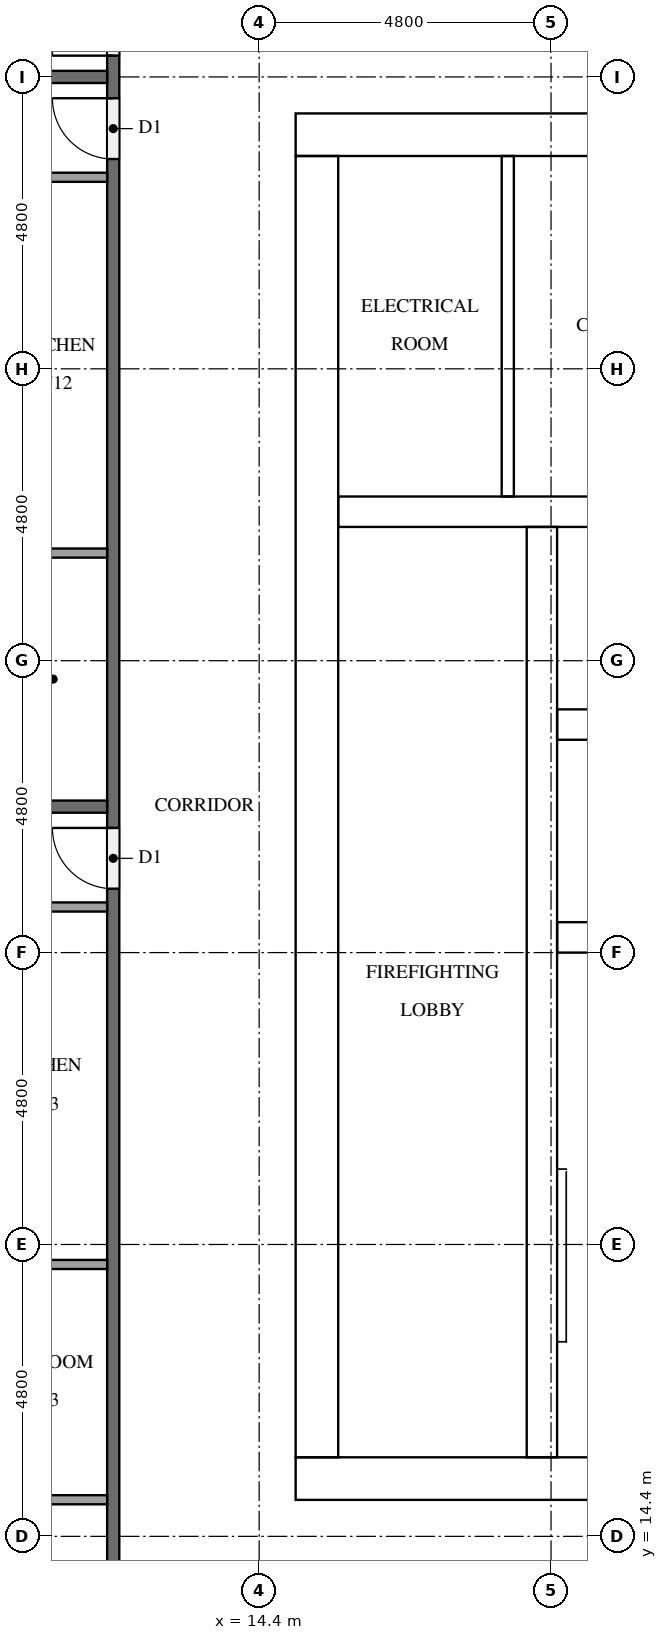
"""IFC4 building model, lengths in metres.
Left out: names, types, materials, properties, quantities, classifications, styles, units other than length and angle.
Written with IfcOpenShell. Run it as: python <this file> out.ifc"""

import sys

from ifc_helpers import new_model, si_unit, direction, frame, frame_2d, origin, place, context, subcontext, project, spatial, rectangle, extrude, element, fill, save


model = new_model("IFC4")
c1 = context("Model", 3, precision=1e-05, world=origin(), true_north=direction((0.0, 1.0)))
c2 = subcontext(c1, "Body", "Model", "MODEL_VIEW")
j1 = project(units=[si_unit("LENGTHUNIT", "METRE"), si_unit("PLANEANGLEUNIT", "RADIAN")], contexts=[c1])
p1 = place(None, origin())
s1 = spatial("IfcSite", under=j1, at=p1, CompositionType="ELEMENT")
p2 = place(p1, origin())
s2 = spatial("IfcBuilding", under=s1, at=p2, CompositionType="ELEMENT")
p3 = place(p2, frame((0.0, 0.0, 182.4)))
s3 = spatial("IfcBuildingStorey", under=s2, at=p3, CompositionType="ELEMENT", Elevation=182.4)
p4 = place(p3, frame((15.0, 15.35, 0.0), z_axis=(0.0, 0.0, 1.0), x_axis=(1.0, 0.0, 0.0)))
e1 = element("IfcWall", 1, at=p4, inside=s3, PredefinedType="SHEAR", context=c2, shape_type="SweptSolid", body=[
    extrude(rectangle(XDim=32.4, YDim=0.7, at=frame_2d((16.2, 0.0))), origin(), (0.0, 0.0, 1.0), 3.2),
])
p5 = place(p4, frame((15.3, 0.0, 0.0)))
e2 = element("IfcOpeningElement", 2, at=p5, cuts=e1, PredefinedType="OPENING", context=c2, shape_type="SweptSolid", body=[
    extrude(rectangle(XDim=1.8, YDim=2.1, at=frame_2d((0.9, 1.05))), frame((0.0, 0.36, 0.0), z_axis=(0.0, -1.0, 0.0), x_axis=(1.0, 0.0, 0.0)), (0.0, 0.0, 1.0), 0.72),
])
p6 = place(p3, frame((15.0, 37.45, 0.0), z_axis=(0.0, 0.0, 1.0), x_axis=(1.0, 0.0, 0.0)))
e3 = element("IfcWall", 3, at=p6, inside=s3, PredefinedType="SHEAR", context=c2, shape_type="SweptSolid", body=[
    extrude(rectangle(XDim=32.4, YDim=0.7, at=frame_2d((16.2, 0.0))), origin(), (0.0, 0.0, 1.0), 3.2),
])
p7 = place(p6, frame((15.3, 0.0, 0.0)))
e4 = element("IfcOpeningElement", 4, at=p7, cuts=e3, PredefinedType="OPENING", context=c2, shape_type="SweptSolid", body=[
    extrude(rectangle(XDim=1.8, YDim=2.1, at=frame_2d((0.9, 1.05))), frame((0.0, 0.36, 0.0), z_axis=(0.0, -1.0, 0.0), x_axis=(1.0, 0.0, 0.0)), (0.0, 0.0, 1.0), 0.72),
])
p8 = place(p6, frame((1.544, 0.0, 0.0)))
e5 = element("IfcOpeningElement", 5, at=p8, cuts=e3, PredefinedType="OPENING", context=c2, shape_type="SweptSolid", body=[
    extrude(rectangle(XDim=1.0, YDim=2.1, at=frame_2d((0.5, 1.05))), frame((0.0, 0.36, 0.0), z_axis=(0.0, -1.0, 0.0), x_axis=(1.0, 0.0, 0.0)), (0.0, 0.0, 1.0), 0.72),
])
p9 = place(p6, frame((5.219, 0.0, 0.0)))
e6 = element("IfcOpeningElement", 6, at=p9, cuts=e3, PredefinedType="OPENING", context=c2, shape_type="SweptSolid", body=[
    extrude(rectangle(XDim=1.0, YDim=2.1, at=frame_2d((0.5, 1.05))), frame((0.0, 0.36, 0.0), z_axis=(0.0, -1.0, 0.0), x_axis=(1.0, 0.0, 0.0)), (0.0, 0.0, 1.0), 0.72),
])
p10 = place(p3, frame((15.35, 15.7, 0.0), z_axis=(0.0, 0.0, 1.0), x_axis=(0.0, 1.0, 0.0)))
e7 = element("IfcWall", 7, at=p10, inside=s3, PredefinedType="SHEAR", context=c2, shape_type="SweptSolid", body=[
    extrude(rectangle(XDim=21.4, YDim=0.7, at=frame_2d((10.7, 0.0))), origin(), (0.0, 0.0, 1.0), 3.2),
])
p11 = place(p10, frame((5.06, 0.0, 0.0)))
e8 = element("IfcOpeningElement", 8, at=p11, cuts=e7, PredefinedType="OPENING", context=c2, shape_type="SweptSolid", body=[
    extrude(rectangle(XDim=1.2, YDim=2.1, at=frame_2d((0.6, 1.05))), frame((0.0, 0.36, 0.0), z_axis=(0.0, -1.0, 0.0), x_axis=(1.0, 0.0, 0.0)), (0.0, 0.0, 1.0), 0.72),
])
p12 = place(p3, frame((19.05, 15.7, 0.0), z_axis=(0.0, 0.0, 1.0), x_axis=(0.0, 1.0, 0.0)))
e9 = element("IfcWall", 9, at=p12, inside=s3, PredefinedType="SHEAR", context=c2, shape_type="SweptSolid", body=[
    extrude(rectangle(XDim=15.3, YDim=0.5, at=frame_2d((7.65, 0.0))), origin(), (0.0, 0.0, 1.0), 3.2),
])
p13 = place(p12, frame((9.75, 0.0, 0.0)))
e10 = element("IfcOpeningElement", 10, at=p13, cuts=e9, PredefinedType="OPENING", context=c2, shape_type="SweptSolid", body=[
    extrude(rectangle(XDim=1.1, YDim=2.1, at=frame_2d((0.55, 1.05))), frame((0.0, 0.26, 0.0), z_axis=(0.0, -1.0, 0.0), x_axis=(1.0, 0.0, 0.0)), (0.0, 0.0, 1.0), 0.52),
])
p14 = place(p12, frame((13.25, 0.0, 0.0)))
e11 = element("IfcOpeningElement", 11, at=p14, cuts=e9, PredefinedType="OPENING", context=c2, shape_type="SweptSolid", body=[
    extrude(rectangle(XDim=1.1, YDim=2.1, at=frame_2d((0.55, 1.05))), frame((0.0, 0.26, 0.0), z_axis=(0.0, -1.0, 0.0), x_axis=(1.0, 0.0, 0.0)), (0.0, 0.0, 1.0), 0.52),
])
p15 = place(p12, frame((0.5, 0.0, 0.0)))
e12 = element("IfcOpeningElement", 12, at=p15, cuts=e9, PredefinedType="OPENING", context=c2, shape_type="SweptSolid", body=[
    extrude(rectangle(XDim=1.2, YDim=2.1, at=frame_2d((0.6, 1.05))), frame((0.0, 0.26, 0.0), z_axis=(0.0, -1.0, 0.0), x_axis=(1.0, 0.0, 0.0)), (0.0, 0.0, 1.0), 0.52),
])
for number, where, z_axis, x_axis in (
    (13, (19.3, 24.25, 0.0), (0.0, 0.0, 1.0), (1.0, 0.0, 0.0)),
    (14, (19.3, 27.75, 0.0), (0.0, 0.0, 1.0), (1.0, 0.0, 0.0)),
):
    element("IfcWall", number, at=place(p3, frame(where, z_axis=z_axis, x_axis=x_axis)), inside=s3, PredefinedType="SHEAR", context=c2, shape_type="SweptSolid", body=[
        extrude(rectangle(XDim=3.55, YDim=0.5, at=frame_2d((1.775, 0.0))), origin(), (0.0, 0.0, 1.0), 3.2),
    ])
p16 = place(p3, frame((15.7, 31.25, 0.0), z_axis=(0.0, 0.0, 1.0), x_axis=(1.0, 0.0, 0.0)))
e15 = element("IfcWall", 15, at=p16, inside=s3, PredefinedType="SHEAR", context=c2, shape_type="SweptSolid", body=[
    extrude(rectangle(XDim=7.15, YDim=0.5, at=frame_2d((3.575, 0.0))), origin(), (0.0, 0.0, 1.0), 3.2),
])
p17 = place(p3, frame((18.489, 31.5, 0.0), z_axis=(0.0, 0.0, 1.0), x_axis=(0.0, 1.0, 0.0)))
e16 = element("IfcWall", 16, at=p17, inside=s3, PredefinedType="PARTITIONING", context=c2, shape_type="SweptSolid", body=[
    extrude(rectangle(XDim=5.6, YDim=0.2, at=frame_2d((2.8, 0.0))), origin(), (0.0, 0.0, 1.0), 3.2),
])
p18 = place(p3, frame((12.0, 12.1, 0.0), z_axis=(0.0, 0.0, 1.0), x_axis=(0.0, 1.0, 0.0)))
e17 = element("IfcWall", 17, at=p18, inside=s3, PredefinedType="PARTITIONING", context=c2, shape_type="SweptSolid", body=[
    extrude(rectangle(XDim=28.6, YDim=0.2, at=frame_2d((14.3, 0.0))), origin(), (0.0, 0.0, 1.0), 3.2),
])
p19 = place(p18, frame((26.65, 0.0, 0.0)))
e18 = element("IfcOpeningElement", 18, at=p19, cuts=e17, PredefinedType="OPENING", context=c2, shape_type="SweptSolid", body=[
    extrude(rectangle(XDim=1.0, YDim=2.1, at=frame_2d((0.5, 1.05))), frame((0.0, 0.11, 0.0), z_axis=(0.0, -1.0, 0.0), x_axis=(1.0, 0.0, 0.0)), (0.0, 0.0, 1.0), 0.22),
])
p20 = place(p18, frame((24.95, 0.0, 0.0)))
e19 = element("IfcOpeningElement", 19, at=p20, cuts=e17, PredefinedType="OPENING", context=c2, shape_type="SweptSolid", body=[
    extrude(rectangle(XDim=1.0, YDim=2.1, at=frame_2d((0.5, 1.05))), frame((0.0, 0.11, 0.0), z_axis=(0.0, -1.0, 0.0), x_axis=(1.0, 0.0, 0.0)), (0.0, 0.0, 1.0), 0.22),
])
p21 = place(p18, frame((12.95, 0.0, 0.0)))
e20 = element("IfcOpeningElement", 20, at=p21, cuts=e17, PredefinedType="OPENING", context=c2, shape_type="SweptSolid", body=[
    extrude(rectangle(XDim=1.0, YDim=2.1, at=frame_2d((0.5, 1.05))), frame((0.0, 0.11, 0.0), z_axis=(0.0, -1.0, 0.0), x_axis=(1.0, 0.0, 0.0)), (0.0, 0.0, 1.0), 0.22),
])
for number, where, z_axis, x_axis in (
    (21, (4.9, 38.4, 0.0), (0.0, 0.0, 1.0), (1.0, 0.0, 0.0)),
    (22, (4.9, 26.4, 0.0), (0.0, 0.0, 1.0), (1.0, 0.0, 0.0)),
):
    element("IfcWall", number, at=place(p3, frame(where, z_axis=z_axis, x_axis=x_axis)), inside=s3, PredefinedType="PARTITIONING", context=c2, shape_type="SweptSolid", body=[
        extrude(rectangle(XDim=7.0, YDim=0.2, at=frame_2d((3.5, 0.0))), origin(), (0.0, 0.0, 1.0), 3.2),
    ])
p22 = place(p3, frame((11.9, 30.57, 0.0), z_axis=(0.0, 0.0, 1.0), x_axis=(-1.0, 0.0, 0.0)))
e23 = element("IfcWall", 23, at=p22, inside=s3, PredefinedType="PARTITIONING", context=c2, shape_type="SweptSolid", body=[
    extrude(rectangle(XDim=1.775, YDim=0.15, at=frame_2d((0.887, 0.0))), origin(), (0.0, 0.0, 1.0), 3.2),
])
p23 = place(p3, frame((11.9, 36.75, 0.0), z_axis=(0.0, 0.0, 1.0), x_axis=(-1.0, 0.0, 0.0)))
e24 = element("IfcWall", 24, at=p23, inside=s3, PredefinedType="PARTITIONING", context=c2, shape_type="SweptSolid", body=[
    extrude(rectangle(XDim=1.925, YDim=0.15, at=frame_2d((0.962, 0.0))), origin(), (0.0, 0.0, 1.0), 3.2),
])
for number, where, z_axis, x_axis in (
    (25, (11.9, 18.871, 0.0), (0.0, 0.0, 1.0), (-1.0, 0.0, 0.0)),
    (26, (11.9, 15.002, 0.0), (0.0, 0.0, 1.0), (-1.0, 0.0, 0.0)),
):
    element("IfcWall", number, at=place(p3, frame(where, z_axis=z_axis, x_axis=x_axis)), inside=s3, PredefinedType="PARTITIONING", context=c2, shape_type="SweptSolid", body=[
        extrude(rectangle(XDim=2.225, YDim=0.15, at=frame_2d((1.112, 0.0))), origin(), (0.0, 0.0, 1.0), 3.2),
    ])
p24 = place(p3, frame((11.9, 24.75, 0.0), z_axis=(0.0, 0.0, 1.0), x_axis=(-1.0, 0.0, 0.0)))
e27 = element("IfcWall", 27, at=p24, inside=s3, PredefinedType="PARTITIONING", context=c2, shape_type="SweptSolid", body=[
    extrude(rectangle(XDim=2.375, YDim=0.15, at=frame_2d((1.188, 0.0))), origin(), (0.0, 0.0, 1.0), 3.2),
])
p25 = place(p13, origin())
e28 = element("IfcDoor", 28, at=p25, inside=s3, OperationType="DOUBLE_DOOR_SLIDING", PredefinedType="DOOR", context=c2, shape_type="SweptSolid", body=[
    extrude(rectangle(XDim=1.1, YDim=2.1, at=frame_2d((0.55, 1.05))), frame((0.0, 0.025, 0.0), z_axis=(0.0, -1.0, 0.0), x_axis=(1.0, 0.0, 0.0)), (0.0, 0.0, 1.0), 0.05),
])
fill(e10, e28)
p26 = place(p14, origin())
e29 = element("IfcDoor", 29, at=p26, inside=s3, OperationType="DOUBLE_DOOR_SLIDING", PredefinedType="DOOR", context=c2, shape_type="SweptSolid", body=[
    extrude(rectangle(XDim=1.1, YDim=2.1, at=frame_2d((0.55, 1.05))), frame((0.0, 0.025, 0.0), z_axis=(0.0, -1.0, 0.0), x_axis=(1.0, 0.0, 0.0)), (0.0, 0.0, 1.0), 0.05),
])
fill(e11, e29)
p27 = place(p15, frame((1.2, 0.0, 0.0), z_axis=(0.0, 0.0, 1.0), x_axis=(-1.0, 0.0, 0.0)))
e30 = element("IfcDoor", 30, at=p27, inside=s3, OperationType="SINGLE_SWING_LEFT", PredefinedType="DOOR", context=c2, shape_type="SweptSolid", body=[
    extrude(rectangle(XDim=1.2, YDim=2.1, at=frame_2d((0.6, 1.05))), frame((0.0, 0.025, 0.0), z_axis=(0.0, -1.0, 0.0), x_axis=(1.0, 0.0, 0.0)), (0.0, 0.0, 1.0), 0.05),
])
fill(e12, e30)
p28 = place(p11, frame((1.2, 0.0, 0.0), z_axis=(0.0, 0.0, 1.0), x_axis=(-1.0, 0.0, 0.0)))
e31 = element("IfcDoor", 31, at=p28, inside=s3, OperationType="SINGLE_SWING_RIGHT", PredefinedType="DOOR", context=c2, shape_type="SweptSolid", body=[
    extrude(rectangle(XDim=1.2, YDim=2.1, at=frame_2d((0.6, 1.05))), frame((0.0, 0.025, 0.0), z_axis=(0.0, -1.0, 0.0), x_axis=(1.0, 0.0, 0.0)), (0.0, 0.0, 1.0), 0.05),
])
fill(e8, e31)
p29 = place(p8, origin())
e32 = element("IfcDoor", 32, at=p29, inside=s3, OperationType="SINGLE_SWING_RIGHT", PredefinedType="DOOR", context=c2, shape_type="SweptSolid", body=[
    extrude(rectangle(XDim=1.0, YDim=2.1, at=frame_2d((0.5, 1.05))), frame((0.0, 0.025, 0.0), z_axis=(0.0, -1.0, 0.0), x_axis=(1.0, 0.0, 0.0)), (0.0, 0.0, 1.0), 0.05),
])
fill(e5, e32)
p30 = place(p19, origin())
e33 = element("IfcDoor", 33, at=p30, inside=s3, OperationType="SINGLE_SWING_LEFT", PredefinedType="DOOR", context=c2, shape_type="SweptSolid", body=[
    extrude(rectangle(XDim=1.0, YDim=2.1, at=frame_2d((0.5, 1.05))), frame((0.0, 0.025, 0.0), z_axis=(0.0, -1.0, 0.0), x_axis=(1.0, 0.0, 0.0)), (0.0, 0.0, 1.0), 0.05),
])
fill(e18, e33)
p31 = place(p20, origin())
e34 = element("IfcDoor", 34, at=p31, inside=s3, OperationType="SINGLE_SWING_RIGHT", PredefinedType="DOOR", context=c2, shape_type="SweptSolid", body=[
    extrude(rectangle(XDim=1.0, YDim=2.1, at=frame_2d((0.5, 1.05))), frame((0.0, 0.025, 0.0), z_axis=(0.0, -1.0, 0.0), x_axis=(1.0, 0.0, 0.0)), (0.0, 0.0, 1.0), 0.05),
])
fill(e19, e34)
p32 = place(p21, origin())
e35 = element("IfcDoor", 35, at=p32, inside=s3, OperationType="SINGLE_SWING_RIGHT", PredefinedType="DOOR", context=c2, shape_type="SweptSolid", body=[
    extrude(rectangle(XDim=1.0, YDim=2.1, at=frame_2d((0.5, 1.05))), frame((0.0, 0.025, 0.0), z_axis=(0.0, -1.0, 0.0), x_axis=(1.0, 0.0, 0.0)), (0.0, 0.0, 1.0), 0.05),
])
fill(e20, e35)
save(model, sys.argv[1])
